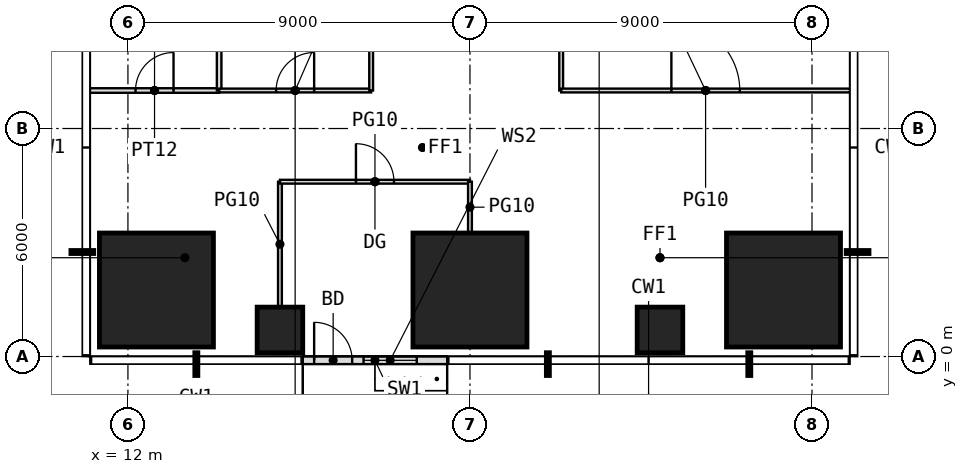
"""IFC4 building model, lengths in metres.
Left out: names, types, materials, properties, quantities, classifications, styles, units other than length and angle.
Written with IfcOpenShell. Run it as: python <this file> out.ifc"""

import sys

from ifc_helpers import new_model, si_unit, direction, frame, frame_2d, origin, origin_2d, place, context, subcontext, project, spatial, rectangle, extrude, element, fill, save


model = new_model("IFC4")
c1 = context("Model", 3, precision=1e-05, world=origin(), true_north=direction((0.0, 1.0)))
c2 = subcontext(c1, "Body", "Model", "MODEL_VIEW")
j1 = project(units=[si_unit("LENGTHUNIT", "METRE"), si_unit("PLANEANGLEUNIT", "RADIAN")], contexts=[c1])
p1 = place(None, origin())
s1 = spatial("IfcSite", under=j1, at=p1, CompositionType="ELEMENT")
p2 = place(p1, origin())
s2 = spatial("IfcBuilding", under=s1, at=p2, CompositionType="ELEMENT")
p3 = place(p2, frame((0.0, 0.0, 108.5)))
s3 = spatial("IfcBuildingStorey", under=s2, at=p3, CompositionType="ELEMENT", Elevation=108.5)
p4 = place(p3, frame((12.75, 1.75, 0.0), z_axis=(0.0, 0.0, 1.0), x_axis=(1.0, 0.0, 0.0)))
e1 = element("IfcColumn", 1, at=p4, inside=s3, PredefinedType="COLUMN", context=c2, shape_type="SweptSolid", body=[
    extrude(rectangle(XDim=3.0, YDim=3.0, at=origin_2d()), origin(), (0.0, 0.0, 1.0), 4.0),
])
p5 = place(p3, frame((16.0, 0.7, 0.0), z_axis=(0.0, 0.0, 1.0), x_axis=(1.0, 0.0, 0.0)))
e2 = element("IfcColumn", 2, at=p5, inside=s3, PredefinedType="COLUMN", context=c2, shape_type="SweptSolid", body=[
    extrude(rectangle(XDim=1.2, YDim=1.2, at=origin_2d()), origin(), (0.0, 0.0, 1.0), 4.0),
])
p6 = place(p3, frame((21.0, 1.75, 0.0), z_axis=(0.0, 0.0, 1.0), x_axis=(1.0, 0.0, 0.0)))
e3 = element("IfcColumn", 3, at=p6, inside=s3, PredefinedType="COLUMN", context=c2, shape_type="SweptSolid", body=[
    extrude(rectangle(XDim=3.0, YDim=3.0, at=origin_2d()), origin(), (0.0, 0.0, 1.0), 4.0),
])
p7 = place(p3, frame((26.0, 0.7, 0.0), z_axis=(0.0, 0.0, 1.0), x_axis=(1.0, 0.0, 0.0)))
e4 = element("IfcColumn", 4, at=p7, inside=s3, PredefinedType="COLUMN", context=c2, shape_type="SweptSolid", body=[
    extrude(rectangle(XDim=1.2, YDim=1.2, at=origin_2d()), origin(), (0.0, 0.0, 1.0), 4.0),
])
p8 = place(p3, frame((29.25, 1.75, 0.0), z_axis=(0.0, 0.0, 1.0), x_axis=(1.0, 0.0, 0.0)))
e5 = element("IfcColumn", 5, at=p8, inside=s3, PredefinedType="COLUMN", context=c2, shape_type="SweptSolid", body=[
    extrude(rectangle(XDim=3.0, YDim=3.0, at=origin_2d()), origin(), (0.0, 0.0, 1.0), 4.0),
])
p9 = place(p3, frame((16.6, -0.1, 0.0), z_axis=(0.0, 0.0, 1.0), x_axis=(1.0, 0.0, 0.0)))
e6 = element("IfcWall", 6, at=p9, inside=s3, PredefinedType="USERDEFINED", context=c2, shape_type="SweptSolid", body=[
    extrude(rectangle(XDim=3.8, YDim=0.2, at=frame_2d((1.9, 0.0))), origin(), (0.0, 0.0, 1.0), 3.75),
])
p10 = place(p9, frame((0.3, 0.0, 0.0)))
e7 = element("IfcOpeningElement", 7, at=p10, cuts=e6, PredefinedType="OPENING", context=c2, shape_type="SweptSolid", body=[
    extrude(rectangle(XDim=1.0, YDim=2.4, at=frame_2d((0.5, 1.2))), frame((0.0, 0.11, 0.0), z_axis=(0.0, -1.0, 0.0), x_axis=(1.0, 0.0, 0.0)), (0.0, 0.0, 1.0), 0.22),
])
p11 = place(p9, frame((1.6, 0.0, 0.3)))
e8 = element("IfcOpeningElement", 8, at=p11, cuts=e6, PredefinedType="OPENING", context=c2, shape_type="SweptSolid", body=[
    extrude(rectangle(XDim=1.4, YDim=2.7, at=frame_2d((0.7, 1.35))), frame((0.0, 0.11, 0.0), z_axis=(0.0, -1.0, 0.0), x_axis=(1.0, 0.0, 0.0)), (0.0, 0.0, 1.0), 0.22),
])
p12 = place(p3, frame((11.0, 7.0, 0.0), z_axis=(0.0, 0.0, 1.0), x_axis=(1.0, 0.0, 0.0)))
e9 = element("IfcWall", 9, at=p12, inside=s3, PredefinedType="PARTITIONING", context=c2, shape_type="SweptSolid", body=[
    extrude(rectangle(XDim=3.4, YDim=0.12, at=frame_2d((1.7, 0.0))), origin(), (0.0, 0.0, 1.0), 3.75),
])
p13 = place(p12, frame((1.2, 0.0, 0.0)))
e10 = element("IfcOpeningElement", 10, at=p13, cuts=e9, PredefinedType="OPENING", context=c2, shape_type="SweptSolid", body=[
    extrude(rectangle(XDim=1.0, YDim=2.2, at=frame_2d((0.5, 1.1))), frame((0.0, 0.07, 0.0), z_axis=(0.0, -1.0, 0.0), x_axis=(1.0, 0.0, 0.0)), (0.0, 0.0, 1.0), 0.14),
])
p14 = place(p3, frame((14.4, 7.0, 0.0), z_axis=(0.0, 0.0, 1.0), x_axis=(0.0, 1.0, 0.0)))
e11 = element("IfcWall", 11, at=p14, inside=s3, PredefinedType="PARTITIONING", context=c2, shape_type="SweptSolid", body=[
    extrude(rectangle(XDim=3.95, YDim=0.12, at=frame_2d((1.975, 0.0))), origin(), (0.0, 0.0, 1.0), 3.75),
])
p15 = place(p3, frame((14.4, 7.0, 0.0), z_axis=(0.0, 0.0, 1.0), x_axis=(1.0, 0.0, 0.0)))
e12 = element("IfcWall", 12, at=p15, inside=s3, PredefinedType="PARTITIONING", context=c2, shape_type="SweptSolid", body=[
    extrude(rectangle(XDim=4.0, YDim=0.1, at=frame_2d((2.0, 0.0))), origin(), (0.0, 0.0, 1.0), 3.75),
])
p16 = place(p15, frame((1.5, 0.0, 0.0)))
e13 = element("IfcOpeningElement", 13, at=p16, cuts=e12, PredefinedType="OPENING", context=c2, shape_type="SweptSolid", body=[
    extrude(rectangle(XDim=1.0, YDim=2.4, at=frame_2d((0.5, 1.2))), frame((0.0, 0.06, 0.0), z_axis=(0.0, -1.0, 0.0), x_axis=(1.0, 0.0, 0.0)), (0.0, 0.0, 1.0), 0.12),
])
p17 = place(p3, frame((16.0, 1.31, 0.0), z_axis=(0.0, 0.0, 1.0), x_axis=(0.0, 1.0, 0.0)))
e14 = element("IfcWall", 14, at=p17, inside=s3, PredefinedType="PARTITIONING", context=c2, shape_type="SweptSolid", body=[
    extrude(rectangle(XDim=3.29, YDim=0.1, at=frame_2d((1.645, 0.0))), origin(), (0.0, 0.0, 1.0), 3.75),
])
p18 = place(p3, frame((16.0, 4.6, 0.0), z_axis=(0.0, 0.0, 1.0), x_axis=(1.0, 0.0, 0.0)))
e15 = element("IfcWall", 15, at=p18, inside=s3, PredefinedType="PARTITIONING", context=c2, shape_type="SweptSolid", body=[
    extrude(rectangle(XDim=5.0, YDim=0.1, at=frame_2d((2.5, 0.0))), origin(), (0.0, 0.0, 1.0), 3.75),
])
p19 = place(p18, frame((2.0, 0.0, 0.0)))
e16 = element("IfcOpeningElement", 16, at=p19, cuts=e15, PredefinedType="OPENING", context=c2, shape_type="SweptSolid", body=[
    extrude(rectangle(XDim=1.0, YDim=2.4, at=frame_2d((0.5, 1.2))), frame((0.0, 0.06, 0.0), z_axis=(0.0, -1.0, 0.0), x_axis=(1.0, 0.0, 0.0)), (0.0, 0.0, 1.0), 0.12),
])
p20 = place(p3, frame((18.4, 7.0, 0.0), z_axis=(0.0, 0.0, 1.0), x_axis=(0.0, 1.0, 0.0)))
e17 = element("IfcWall", 17, at=p20, inside=s3, PredefinedType="PARTITIONING", context=c2, shape_type="SweptSolid", body=[
    extrude(rectangle(XDim=3.95, YDim=0.1, at=frame_2d((1.975, 0.0))), origin(), (0.0, 0.0, 1.0), 3.75),
])
p21 = place(p3, frame((21.0, 3.26, 0.0), z_axis=(0.0, 0.0, 1.0), x_axis=(0.0, 1.0, 0.0)))
e18 = element("IfcWall", 18, at=p21, inside=s3, PredefinedType="PARTITIONING", context=c2, shape_type="SweptSolid", body=[
    extrude(rectangle(XDim=1.34, YDim=0.1, at=frame_2d((0.67, 0.0))), origin(), (0.0, 0.0, 1.0), 3.75),
])
p22 = place(p3, frame((23.4, 7.0, 0.0), z_axis=(0.0, 0.0, 1.0), x_axis=(0.0, 1.0, 0.0)))
e19 = element("IfcWall", 19, at=p22, inside=s3, PredefinedType="PARTITIONING", context=c2, shape_type="SweptSolid", body=[
    extrude(rectangle(XDim=3.95, YDim=0.1, at=frame_2d((1.975, 0.0))), origin(), (0.0, 0.0, 1.0), 3.75),
])
p23 = place(p3, frame((23.4, 7.0, 0.0), z_axis=(0.0, 0.0, 1.0), x_axis=(1.0, 0.0, 0.0)))
e20 = element("IfcWall", 20, at=p23, inside=s3, PredefinedType="PARTITIONING", context=c2, shape_type="SweptSolid", body=[
    extrude(rectangle(XDim=7.6, YDim=0.1, at=frame_2d((3.8, 0.0))), origin(), (0.0, 0.0, 1.0), 3.75),
])
p24 = place(p23, frame((2.9, 0.0, 0.0)))
e21 = element("IfcOpeningElement", 21, at=p24, cuts=e20, PredefinedType="OPENING", context=c2, shape_type="SweptSolid", body=[
    extrude(rectangle(XDim=1.8, YDim=2.4, at=frame_2d((0.9, 1.2))), frame((0.0, 0.06, 0.0), z_axis=(0.0, -1.0, 0.0), x_axis=(1.0, 0.0, 0.0)), (0.0, 0.0, 1.0), 0.12),
])
p25 = place(p10, origin())
e22 = element("IfcDoor", 22, at=p25, inside=s3, OperationType="SINGLE_SWING_LEFT", PredefinedType="DOOR", context=c2, shape_type="SweptSolid", body=[
    extrude(rectangle(XDim=1.0, YDim=2.4, at=frame_2d((0.5, 1.2))), frame((0.0, 0.025, 0.0), z_axis=(0.0, -1.0, 0.0), x_axis=(1.0, 0.0, 0.0)), (0.0, 0.0, 1.0), 0.05),
])
fill(e7, e22)
p26 = place(p11, origin())
e23 = element("IfcWindow", 23, at=p26, inside=s3, PartitioningType="SINGLE_PANEL", PredefinedType="WINDOW", context=c2, shape_type="SweptSolid", body=[
    extrude(rectangle(XDim=1.4, YDim=2.7, at=frame_2d((0.7, 1.35))), frame((0.0, 0.03, 0.0), z_axis=(0.0, -1.0, 0.0), x_axis=(1.0, 0.0, 0.0)), (0.0, 0.0, 1.0), 0.06),
])
fill(e8, e23)
p27 = place(p13, origin())
e24 = element("IfcDoor", 24, at=p27, inside=s3, OperationType="SINGLE_SWING_RIGHT", PredefinedType="DOOR", context=c2, shape_type="SweptSolid", body=[
    extrude(rectangle(XDim=1.0, YDim=2.2, at=frame_2d((0.5, 1.1))), frame((0.0, 0.025, 0.0), z_axis=(0.0, -1.0, 0.0), x_axis=(1.0, 0.0, 0.0)), (0.0, 0.0, 1.0), 0.05),
])
fill(e10, e24)
p28 = place(p16, origin())
e25 = element("IfcDoor", 25, at=p28, inside=s3, OperationType="SINGLE_SWING_RIGHT", PredefinedType="DOOR", context=c2, shape_type="SweptSolid", body=[
    extrude(rectangle(XDim=1.0, YDim=2.4, at=frame_2d((0.5, 1.2))), frame((0.0, 0.025, 0.0), z_axis=(0.0, -1.0, 0.0), x_axis=(1.0, 0.0, 0.0)), (0.0, 0.0, 1.0), 0.05),
])
fill(e13, e25)
p29 = place(p24, origin())
e26 = element("IfcDoor", 26, at=p29, inside=s3, OperationType="DOUBLE_DOOR_SINGLE_SWING", PredefinedType="DOOR", context=c2, shape_type="SweptSolid", body=[
    extrude(rectangle(XDim=1.8, YDim=2.4, at=frame_2d((0.9, 1.2))), frame((0.0, 0.025, 0.0), z_axis=(0.0, -1.0, 0.0), x_axis=(1.0, 0.0, 0.0)), (0.0, 0.0, 1.0), 0.05),
])
fill(e21, e26)
p30 = place(p19, origin())
e27 = element("IfcDoor", 27, at=p30, inside=s3, OperationType="SINGLE_SWING_LEFT", PredefinedType="DOOR", context=c2, shape_type="SweptSolid", body=[
    extrude(rectangle(XDim=1.0, YDim=2.4, at=frame_2d((0.5, 1.2))), frame((0.0, 0.025, 0.0), z_axis=(0.0, -1.0, 0.0), x_axis=(1.0, 0.0, 0.0)), (0.0, 0.0, 1.0), 0.05),
])
fill(e16, e27)
save(model, sys.argv[1])
